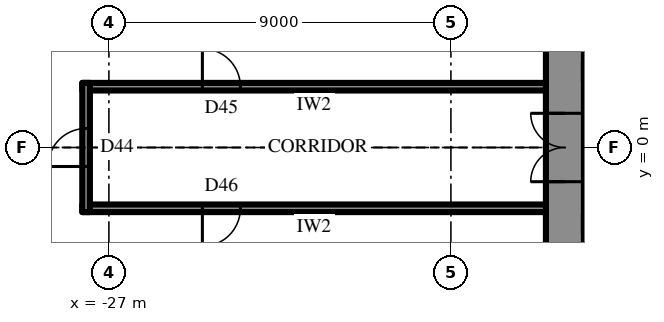
"""IFC4 building model, lengths in metres.
Left out: names, types, materials, properties, quantities, classifications, styles, units other than length and angle.
Written with IfcOpenShell. Run it as: python <this file> out.ifc"""

import sys

from ifc_helpers import new_model, si_unit, direction, frame, frame_2d, origin, place, context, subcontext, project, spatial, rectangle, extrude, element, fill, save


model = new_model("IFC4")
c1 = context("Model", 3, precision=1e-05, world=origin(), true_north=direction((0.0, 1.0)))
c2 = subcontext(c1, "Body", "Model", "MODEL_VIEW")
j1 = project(units=[si_unit("LENGTHUNIT", "METRE"), si_unit("PLANEANGLEUNIT", "RADIAN")], contexts=[c1])
p1 = place(None, origin())
s1 = spatial("IfcSite", under=j1, at=p1, CompositionType="ELEMENT")
p2 = place(p1, origin())
s2 = spatial("IfcBuilding", under=s1, at=p2, CompositionType="ELEMENT")
p3 = place(p2, frame((0.0, 0.0, 278.5)))
s3 = spatial("IfcBuildingStorey", under=s2, at=p3, CompositionType="ELEMENT", Elevation=278.5)
p4 = place(p3, frame((-15.0, 10.7, 0.0), z_axis=(0.0, 0.0, 1.0), x_axis=(0.0, -1.0, 0.0)))
e1 = element("IfcWall", 1, at=p4, inside=s3, PredefinedType="SHEAR", context=c2, shape_type="SweptSolid", body=[
    extrude(rectangle(XDim=21.4, YDim=1.0, at=frame_2d((10.7, 0.0))), origin(), (0.0, 0.0, 1.0), 4.2),
])
p5 = place(p4, frame((9.8, 0.0, 0.0)))
e2 = element("IfcOpeningElement", 2, at=p5, cuts=e1, PredefinedType="OPENING", context=c2, shape_type="SweptSolid", body=[
    extrude(rectangle(XDim=1.8, YDim=2.4, at=frame_2d((0.9, 1.2))), frame((0.0, 0.51, 0.0), z_axis=(0.0, -1.0, 0.0), x_axis=(1.0, 0.0, 0.0)), (0.0, 0.0, 1.0), 1.02),
])
p6 = place(p3, frame((-12.3, -2.0, 0.0), z_axis=(0.0, 0.0, 1.0), x_axis=(-1.0, 0.0, 0.0)))
e3 = element("IfcWall", 3, at=p6, inside=s3, PredefinedType="SHEAR", context=c2, shape_type="SweptSolid", body=[
    extrude(rectangle(XDim=2.2, YDim=0.5, at=frame_2d((1.1, 0.0))), origin(), (0.0, 0.0, 1.0), 4.2),
])
p7 = place(p6, frame((0.8, 0.0, 0.0)))
e4 = element("IfcOpeningElement", 4, at=p7, cuts=e3, PredefinedType="OPENING", context=c2, shape_type="SweptSolid", body=[
    extrude(rectangle(XDim=0.9, YDim=2.2, at=frame_2d((0.45, 1.1))), frame((0.0, 0.26, 0.0), z_axis=(0.0, -1.0, 0.0), x_axis=(1.0, 0.0, 0.0)), (0.0, 0.0, 1.0), 0.52),
])
p8 = place(p3, frame((-15.5, 1.6, 0.0), z_axis=(0.0, 0.0, 1.0), x_axis=(-1.0, 0.0, 0.0)))
e5 = element("IfcWall", 5, at=p8, inside=s3, PredefinedType="PARTITIONING", context=c2, shape_type="SweptSolid", body=[
    extrude(rectangle(XDim=12.2, YDim=0.2, at=frame_2d((6.1, 0.0))), origin(), (0.0, 0.0, 1.0), 4.0),
])
p9 = place(p8, frame((8.04, 0.0, 0.0)))
e6 = element("IfcOpeningElement", 6, at=p9, cuts=e5, PredefinedType="OPENING", context=c2, shape_type="SweptSolid", body=[
    extrude(rectangle(XDim=1.0, YDim=2.2, at=frame_2d((0.5, 1.1))), frame((0.0, 0.11, 0.0), z_axis=(0.0, -1.0, 0.0), x_axis=(1.0, 0.0, 0.0)), (0.0, 0.0, 1.0), 0.22),
])
p10 = place(p3, frame((-15.5, -1.6, 0.0), z_axis=(0.0, 0.0, 1.0), x_axis=(-1.0, 0.0, 0.0)))
e7 = element("IfcWall", 7, at=p10, inside=s3, PredefinedType="PARTITIONING", context=c2, shape_type="SweptSolid", body=[
    extrude(rectangle(XDim=12.2, YDim=0.2, at=frame_2d((6.1, 0.0))), origin(), (0.0, 0.0, 1.0), 4.0),
])
p11 = place(p10, frame((8.04, 0.0, 0.0)))
e8 = element("IfcOpeningElement", 8, at=p11, cuts=e7, PredefinedType="OPENING", context=c2, shape_type="SweptSolid", body=[
    extrude(rectangle(XDim=1.0, YDim=2.2, at=frame_2d((0.5, 1.1))), frame((0.0, 0.11, 0.0), z_axis=(0.0, -1.0, 0.0), x_axis=(1.0, 0.0, 0.0)), (0.0, 0.0, 1.0), 0.22),
])
p12 = place(p3, frame((-27.6, -1.7, 0.0), z_axis=(0.0, 0.0, 1.0), x_axis=(0.0, 1.0, 0.0)))
e9 = element("IfcWall", 9, at=p12, inside=s3, PredefinedType="PARTITIONING", context=c2, shape_type="SweptSolid", body=[
    extrude(rectangle(XDim=3.4, YDim=0.2, at=frame_2d((1.7, 0.0))), origin(), (0.0, 0.0, 1.0), 4.0),
])
p13 = place(p12, frame((1.2, 0.0, 0.0)))
e10 = element("IfcOpeningElement", 10, at=p13, cuts=e9, PredefinedType="OPENING", context=c2, shape_type="SweptSolid", body=[
    extrude(rectangle(XDim=1.0, YDim=2.2, at=frame_2d((0.5, 1.1))), frame((0.0, 0.11, 0.0), z_axis=(0.0, -1.0, 0.0), x_axis=(1.0, 0.0, 0.0)), (0.0, 0.0, 1.0), 0.22),
])
p14 = place(p5, frame((1.8, 0.0, 0.0), z_axis=(0.0, 0.0, 1.0), x_axis=(-1.0, 0.0, 0.0)))
e11 = element("IfcDoor", 11, at=p14, inside=s3, OperationType="DOUBLE_DOOR_SINGLE_SWING", PredefinedType="DOOR", context=c2, shape_type="SweptSolid", body=[
    extrude(rectangle(XDim=1.8, YDim=2.4, at=frame_2d((0.9, 1.2))), frame((0.0, 0.025, 0.0), z_axis=(0.0, -1.0, 0.0), x_axis=(1.0, 0.0, 0.0)), (0.0, 0.0, 1.0), 0.05),
])
fill(e2, e11)
p15 = place(p9, frame((1.0, 0.0, 0.0), z_axis=(0.0, 0.0, 1.0), x_axis=(-1.0, 0.0, 0.0)))
e12 = element("IfcDoor", 12, at=p15, inside=s3, OperationType="SINGLE_SWING_RIGHT", PredefinedType="DOOR", context=c2, shape_type="SweptSolid", body=[
    extrude(rectangle(XDim=1.0, YDim=2.2, at=frame_2d((0.5, 1.1))), frame((0.0, 0.025, 0.0), z_axis=(0.0, -1.0, 0.0), x_axis=(1.0, 0.0, 0.0)), (0.0, 0.0, 1.0), 0.05),
])
fill(e6, e12)
p16 = place(p11, origin())
e13 = element("IfcDoor", 13, at=p16, inside=s3, OperationType="SINGLE_SWING_LEFT", PredefinedType="DOOR", context=c2, shape_type="SweptSolid", body=[
    extrude(rectangle(XDim=1.0, YDim=2.2, at=frame_2d((0.5, 1.1))), frame((0.0, 0.025, 0.0), z_axis=(0.0, -1.0, 0.0), x_axis=(1.0, 0.0, 0.0)), (0.0, 0.0, 1.0), 0.05),
])
fill(e8, e13)
p17 = place(p13, origin())
e14 = element("IfcDoor", 14, at=p17, inside=s3, OperationType="SINGLE_SWING_RIGHT", PredefinedType="DOOR", context=c2, shape_type="SweptSolid", body=[
    extrude(rectangle(XDim=1.0, YDim=2.2, at=frame_2d((0.5, 1.1))), frame((0.0, 0.025, 0.0), z_axis=(0.0, -1.0, 0.0), x_axis=(1.0, 0.0, 0.0)), (0.0, 0.0, 1.0), 0.05),
])
fill(e10, e14)
save(model, sys.argv[1])
